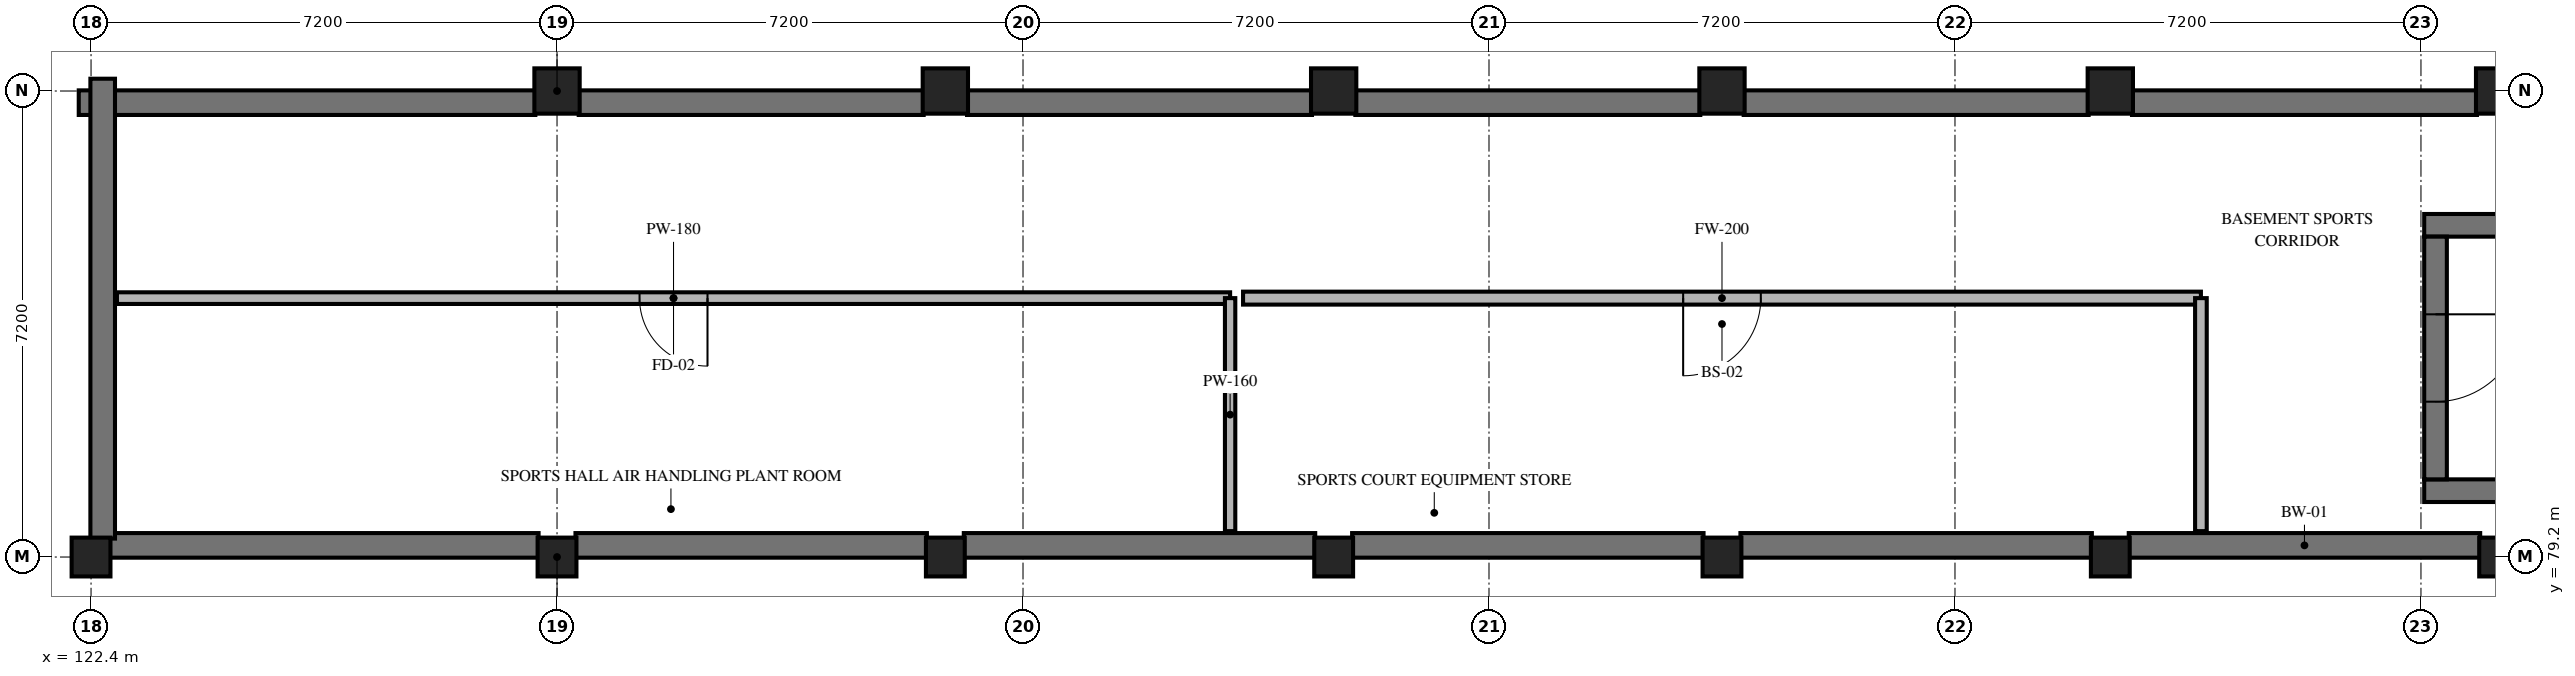
"""IFC4 building model, lengths in metres.
Left out: names, types, materials, properties, quantities, classifications, styles, units other than length and angle.
Written with IfcOpenShell. Run it as: python <this file> out.ifc"""

import sys

from ifc_helpers import new_model, si_unit, direction, frame, frame_2d, origin, origin_2d, place, context, subcontext, project, spatial, rectangle, extrude, element, fill, save


model = new_model("IFC4")
c1 = context("Model", 3, precision=1e-05, world=origin(), true_north=direction((0.0, 1.0)))
c2 = subcontext(c1, "Body", "Model", "MODEL_VIEW")
j1 = project(units=[si_unit("LENGTHUNIT", "METRE"), si_unit("PLANEANGLEUNIT", "RADIAN")], contexts=[c1])
p1 = place(None, origin())
s1 = spatial("IfcSite", under=j1, at=p1, CompositionType="ELEMENT")
p2 = place(p1, origin())
s2 = spatial("IfcBuilding", under=s1, at=p2, CompositionType="ELEMENT")
p3 = place(p2, frame((0.0, 0.0, -4.2)))
s3 = spatial("IfcBuildingStorey", under=s2, at=p3, CompositionType="ELEMENT", Elevation=-4.2)
p4 = place(p3, frame((129.6, 86.4, 0.0), z_axis=(0.0, 0.0, 1.0), x_axis=(1.0, 0.0, 0.0)))
e1 = element("IfcColumn", 1, at=p4, inside=s3, PredefinedType="COLUMN", context=c2, shape_type="SweptSolid", body=[
    extrude(rectangle(XDim=0.7, YDim=0.7, at=origin_2d()), origin(), (0.0, 0.0, 1.0), 4.2),
])
p5 = place(p3, frame((129.6, 79.2, 0.0), z_axis=(0.0, 0.0, 1.0), x_axis=(1.0, 0.0, 0.0)))
e2 = element("IfcColumn", 2, at=p5, inside=s3, PredefinedType="COLUMN", context=c2, shape_type="SweptSolid", body=[
    extrude(rectangle(XDim=0.6, YDim=0.6, at=origin_2d()), origin(), (0.0, 0.0, 1.0), 4.2),
])
p6 = place(p3, frame((135.6, 86.4, 0.0), z_axis=(0.0, 0.0, 1.0), x_axis=(1.0, 0.0, 0.0)))
e3 = element("IfcColumn", 3, at=p6, inside=s3, PredefinedType="COLUMN", context=c2, shape_type="SweptSolid", body=[
    extrude(rectangle(XDim=0.7, YDim=0.7, at=origin_2d()), origin(), (0.0, 0.0, 1.0), 4.2),
])
p7 = place(p3, frame((135.6, 79.2, 0.0), z_axis=(0.0, 0.0, 1.0), x_axis=(1.0, 0.0, 0.0)))
e4 = element("IfcColumn", 4, at=p7, inside=s3, PredefinedType="COLUMN", context=c2, shape_type="SweptSolid", body=[
    extrude(rectangle(XDim=0.6, YDim=0.6, at=origin_2d()), origin(), (0.0, 0.0, 1.0), 4.2),
])
p8 = place(p3, frame((141.6, 86.4, 0.0), z_axis=(0.0, 0.0, 1.0), x_axis=(1.0, 0.0, 0.0)))
e5 = element("IfcColumn", 5, at=p8, inside=s3, PredefinedType="COLUMN", context=c2, shape_type="SweptSolid", body=[
    extrude(rectangle(XDim=0.7, YDim=0.7, at=origin_2d()), origin(), (0.0, 0.0, 1.0), 4.2),
])
p9 = place(p3, frame((141.6, 79.2, 0.0), z_axis=(0.0, 0.0, 1.0), x_axis=(1.0, 0.0, 0.0)))
e6 = element("IfcColumn", 6, at=p9, inside=s3, PredefinedType="COLUMN", context=c2, shape_type="SweptSolid", body=[
    extrude(rectangle(XDim=0.6, YDim=0.6, at=origin_2d()), origin(), (0.0, 0.0, 1.0), 4.2),
])
p10 = place(p3, frame((147.6, 86.4, 0.0), z_axis=(0.0, 0.0, 1.0), x_axis=(1.0, 0.0, 0.0)))
e7 = element("IfcColumn", 7, at=p10, inside=s3, PredefinedType="COLUMN", context=c2, shape_type="SweptSolid", body=[
    extrude(rectangle(XDim=0.7, YDim=0.7, at=origin_2d()), origin(), (0.0, 0.0, 1.0), 4.2),
])
p11 = place(p3, frame((147.6, 79.2, 0.0), z_axis=(0.0, 0.0, 1.0), x_axis=(1.0, 0.0, 0.0)))
e8 = element("IfcColumn", 8, at=p11, inside=s3, PredefinedType="COLUMN", context=c2, shape_type="SweptSolid", body=[
    extrude(rectangle(XDim=0.6, YDim=0.6, at=origin_2d()), origin(), (0.0, 0.0, 1.0), 4.2),
])
p12 = place(p3, frame((153.6, 86.4, 0.0), z_axis=(0.0, 0.0, 1.0), x_axis=(1.0, 0.0, 0.0)))
e9 = element("IfcColumn", 9, at=p12, inside=s3, PredefinedType="COLUMN", context=c2, shape_type="SweptSolid", body=[
    extrude(rectangle(XDim=0.7, YDim=0.7, at=origin_2d()), origin(), (0.0, 0.0, 1.0), 4.2),
])
p13 = place(p3, frame((153.6, 79.2, 0.0), z_axis=(0.0, 0.0, 1.0), x_axis=(1.0, 0.0, 0.0)))
e10 = element("IfcColumn", 10, at=p13, inside=s3, PredefinedType="COLUMN", context=c2, shape_type="SweptSolid", body=[
    extrude(rectangle(XDim=0.6, YDim=0.6, at=origin_2d()), origin(), (0.0, 0.0, 1.0), 4.2),
])
p14 = place(p3, frame((159.6, 86.4, 0.0), z_axis=(0.0, 0.0, 1.0), x_axis=(1.0, 0.0, 0.0)))
e11 = element("IfcColumn", 11, at=p14, inside=s3, PredefinedType="COLUMN", context=c2, shape_type="SweptSolid", body=[
    extrude(rectangle(XDim=0.7, YDim=0.7, at=origin_2d()), origin(), (0.0, 0.0, 1.0), 4.2),
])
for number, where, z_axis, x_axis in (
    (12, (159.6, 79.2, 0.0), (0.0, 0.0, 1.0), (1.0, 0.0, 0.0)),
    (13, (122.4, 79.2, 0.0), (0.0, 0.0, 1.0), (1.0, 0.0, 0.0)),
):
    element("IfcColumn", number, at=place(p3, frame(where, z_axis=z_axis, x_axis=x_axis)), inside=s3, PredefinedType="COLUMN", context=c2, shape_type="SweptSolid", body=[
        extrude(rectangle(XDim=0.6, YDim=0.6, at=origin_2d()), origin(), (0.0, 0.0, 1.0), 4.2),
    ])
for number, where, z_axis, x_axis in (
    (14, (159.315, 79.38, 0.0), (0.0, 0.0, 1.0), (-1.0, 0.0, 0.0)),
    (15, (153.315, 79.38, 0.0), (0.0, 0.0, 1.0), (-1.0, 0.0, 0.0)),
    (16, (147.315, 79.38, 0.0), (0.0, 0.0, 1.0), (-1.0, 0.0, 0.0)),
    (17, (141.315, 79.38, 0.0), (0.0, 0.0, 1.0), (-1.0, 0.0, 0.0)),
    (18, (135.315, 79.38, 0.0), (0.0, 0.0, 1.0), (-1.0, 0.0, 0.0)),
):
    element("IfcWall", number, at=place(p3, frame(where, z_axis=z_axis, x_axis=x_axis)), inside=s3, PredefinedType="SOLIDWALL", context=c2, shape_type="SweptSolid", body=[
        extrude(rectangle(XDim=5.43, YDim=0.38, at=frame_2d((2.715, 0.0))), origin(), (0.0, 0.0, 1.0), 3.92),
    ])
p15 = place(p3, frame((129.315, 79.38, 0.0), z_axis=(0.0, 0.0, 1.0), x_axis=(-1.0, 0.0, 0.0)))
e19 = element("IfcWall", 19, at=p15, inside=s3, PredefinedType="SOLIDWALL", context=c2, shape_type="SweptSolid", body=[
    extrude(rectangle(XDim=6.63, YDim=0.38, at=frame_2d((3.315, 0.0))), origin(), (0.0, 0.0, 1.0), 3.92),
])
p16 = place(p3, frame((122.21, 86.22, 0.0), z_axis=(0.0, 0.0, 1.0), x_axis=(1.0, 0.0, 0.0)))
e20 = element("IfcWall", 20, at=p16, inside=s3, PredefinedType="SOLIDWALL", context=c2, shape_type="SweptSolid", body=[
    extrude(rectangle(XDim=7.055, YDim=0.38, at=frame_2d((3.527, 0.0))), origin(), (0.0, 0.0, 1.0), 3.92),
])
for number, where, z_axis, x_axis in (
    (21, (129.935, 86.22, 0.0), (0.0, 0.0, 1.0), (1.0, 0.0, 0.0)),
    (22, (135.935, 86.22, 0.0), (0.0, 0.0, 1.0), (1.0, 0.0, 0.0)),
    (23, (141.935, 86.22, 0.0), (0.0, 0.0, 1.0), (1.0, 0.0, 0.0)),
    (24, (147.935, 86.22, 0.0), (0.0, 0.0, 1.0), (1.0, 0.0, 0.0)),
    (25, (153.935, 86.22, 0.0), (0.0, 0.0, 1.0), (1.0, 0.0, 0.0)),
):
    element("IfcWall", number, at=place(p3, frame(where, z_axis=z_axis, x_axis=x_axis)), inside=s3, PredefinedType="SOLIDWALL", context=c2, shape_type="SweptSolid", body=[
        extrude(rectangle(XDim=5.33, YDim=0.38, at=frame_2d((2.665, 0.0))), origin(), (0.0, 0.0, 1.0), 3.92),
    ])
p17 = place(p3, frame((122.58, 79.485, 0.0), z_axis=(0.0, 0.0, 1.0), x_axis=(0.0, 1.0, 0.0)))
e26 = element("IfcWall", 26, at=p17, inside=s3, PredefinedType="SOLIDWALL", context=c2, shape_type="SweptSolid", body=[
    extrude(rectangle(XDim=7.105, YDim=0.38, at=frame_2d((3.552, 0.0))), origin(), (0.0, 0.0, 1.0), 3.92),
])
for number, where, z_axis, x_axis in (
    (27, (158.45, 80.225, 0.0), (0.0, 0.0, 1.0), (1.0, 0.0, 0.0)),
    (28, (167.55, 84.325, 0.0), (0.0, 0.0, 1.0), (-1.0, 0.0, 0.0)),
):
    element("IfcWall", number, at=place(p3, frame(where, z_axis=z_axis, x_axis=x_axis)), inside=s3, PredefinedType="SHEAR", context=c2, shape_type="SweptSolid", body=[
        extrude(rectangle(XDim=9.1, YDim=0.35, at=frame_2d((4.55, 0.0))), origin(), (0.0, 0.0, 1.0), 3.92),
    ])
p18 = place(p3, frame((158.625, 84.15, 0.0), z_axis=(0.0, 0.0, 1.0), x_axis=(0.0, -1.0, 0.0)))
e29 = element("IfcWall", 29, at=p18, inside=s3, PredefinedType="SHEAR", context=c2, shape_type="SweptSolid", body=[
    extrude(rectangle(XDim=3.75, YDim=0.35, at=frame_2d((1.875, 0.0))), origin(), (0.0, 0.0, 1.0), 3.92),
])
p19 = place(p18, frame((1.2, 0.0, 0.0)))
e30 = element("IfcOpeningElement", 30, at=p19, cuts=e29, PredefinedType="OPENING", context=c2, shape_type="SweptSolid", body=[
    extrude(rectangle(XDim=1.35, YDim=2.2, at=frame_2d((0.675, 1.1))), frame((0.0, 0.185, 0.0), z_axis=(0.0, -1.0, 0.0), x_axis=(1.0, 0.0, 0.0)), (0.0, 0.0, 1.0), 0.37),
])
p20 = place(p3, frame((140.0, 83.2, 0.0), z_axis=(0.0, 0.0, 1.0), x_axis=(-1.0, 0.0, 0.0)))
e31 = element("IfcWall", 31, at=p20, inside=s3, PredefinedType="PARTITIONING", context=c2, shape_type="SweptSolid", body=[
    extrude(rectangle(XDim=17.2, YDim=0.18, at=frame_2d((8.6, 0.0))), origin(), (0.0, 0.0, 1.0), 3.52),
])
p21 = place(p20, frame((8.075, 0.0, 0.0)))
e32 = element("IfcOpeningElement", 32, at=p21, cuts=e31, PredefinedType="OPENING", context=c2, shape_type="SweptSolid", body=[
    extrude(rectangle(XDim=1.05, YDim=2.15, at=frame_2d((0.525, 1.075))), frame((0.0, 0.1, 0.0), z_axis=(0.0, -1.0, 0.0), x_axis=(1.0, 0.0, 0.0)), (0.0, 0.0, 1.0), 0.2),
])
p22 = place(p3, frame((140.0, 79.6, 0.0), z_axis=(0.0, 0.0, 1.0), x_axis=(0.0, 1.0, 0.0)))
e33 = element("IfcWall", 33, at=p22, inside=s3, PredefinedType="PARTITIONING", context=c2, shape_type="SweptSolid", body=[
    extrude(rectangle(XDim=3.6, YDim=0.16, at=frame_2d((1.8, 0.0))), origin(), (0.0, 0.0, 1.0), 3.68),
])
p23 = place(p3, frame((155.0, 83.2, 0.0), z_axis=(0.0, 0.0, 1.0), x_axis=(-1.0, 0.0, 0.0)))
e34 = element("IfcWall", 34, at=p23, inside=s3, PredefinedType="PARTITIONING", context=c2, shape_type="SweptSolid", body=[
    extrude(rectangle(XDim=14.8, YDim=0.2, at=frame_2d((7.4, 0.0))), origin(), (0.0, 0.0, 1.0), 3.52),
])
p24 = place(p23, frame((6.8, 0.0, 0.0)))
e35 = element("IfcOpeningElement", 35, at=p24, cuts=e34, PredefinedType="OPENING", context=c2, shape_type="SweptSolid", body=[
    extrude(rectangle(XDim=1.2, YDim=2.2, at=frame_2d((0.6, 1.1))), frame((0.0, 0.11, 0.0), z_axis=(0.0, -1.0, 0.0), x_axis=(1.0, 0.0, 0.0)), (0.0, 0.0, 1.0), 0.22),
])
p25 = place(p3, frame((155.0, 79.6, 0.0), z_axis=(0.0, 0.0, 1.0), x_axis=(0.0, 1.0, 0.0)))
e36 = element("IfcWall", 36, at=p25, inside=s3, PredefinedType="PARTITIONING", context=c2, shape_type="SweptSolid", body=[
    extrude(rectangle(XDim=3.6, YDim=0.18, at=frame_2d((1.8, 0.0))), origin(), (0.0, 0.0, 1.0), 3.92),
])
p26 = place(p19, origin())
e37 = element("IfcDoor", 37, at=p26, inside=s3, OperationType="SINGLE_SWING_LEFT", PredefinedType="DOOR", context=c2, shape_type="SweptSolid", body=[
    extrude(rectangle(XDim=1.35, YDim=2.2, at=frame_2d((0.675, 1.1))), frame((0.0, 0.025, 0.0), z_axis=(0.0, -1.0, 0.0), x_axis=(1.0, 0.0, 0.0)), (0.0, 0.0, 1.0), 0.05),
])
fill(e30, e37)
p27 = place(p21, origin())
e38 = element("IfcDoor", 38, at=p27, inside=s3, OperationType="SINGLE_SWING_LEFT", PredefinedType="DOOR", context=c2, shape_type="SweptSolid", body=[
    extrude(rectangle(XDim=1.05, YDim=2.15, at=frame_2d((0.525, 1.075))), frame((0.0, 0.025, 0.0), z_axis=(0.0, -1.0, 0.0), x_axis=(1.0, 0.0, 0.0)), (0.0, 0.0, 1.0), 0.05),
])
fill(e32, e38)
p28 = place(p24, origin())
e39 = element("IfcDoor", 39, at=p28, inside=s3, OperationType="SINGLE_SWING_RIGHT", PredefinedType="DOOR", context=c2, shape_type="SweptSolid", body=[
    extrude(rectangle(XDim=1.2, YDim=2.2, at=frame_2d((0.6, 1.1))), frame((0.0, 0.025, 0.0), z_axis=(0.0, -1.0, 0.0), x_axis=(1.0, 0.0, 0.0)), (0.0, 0.0, 1.0), 0.05),
])
fill(e35, e39)
save(model, sys.argv[1])
